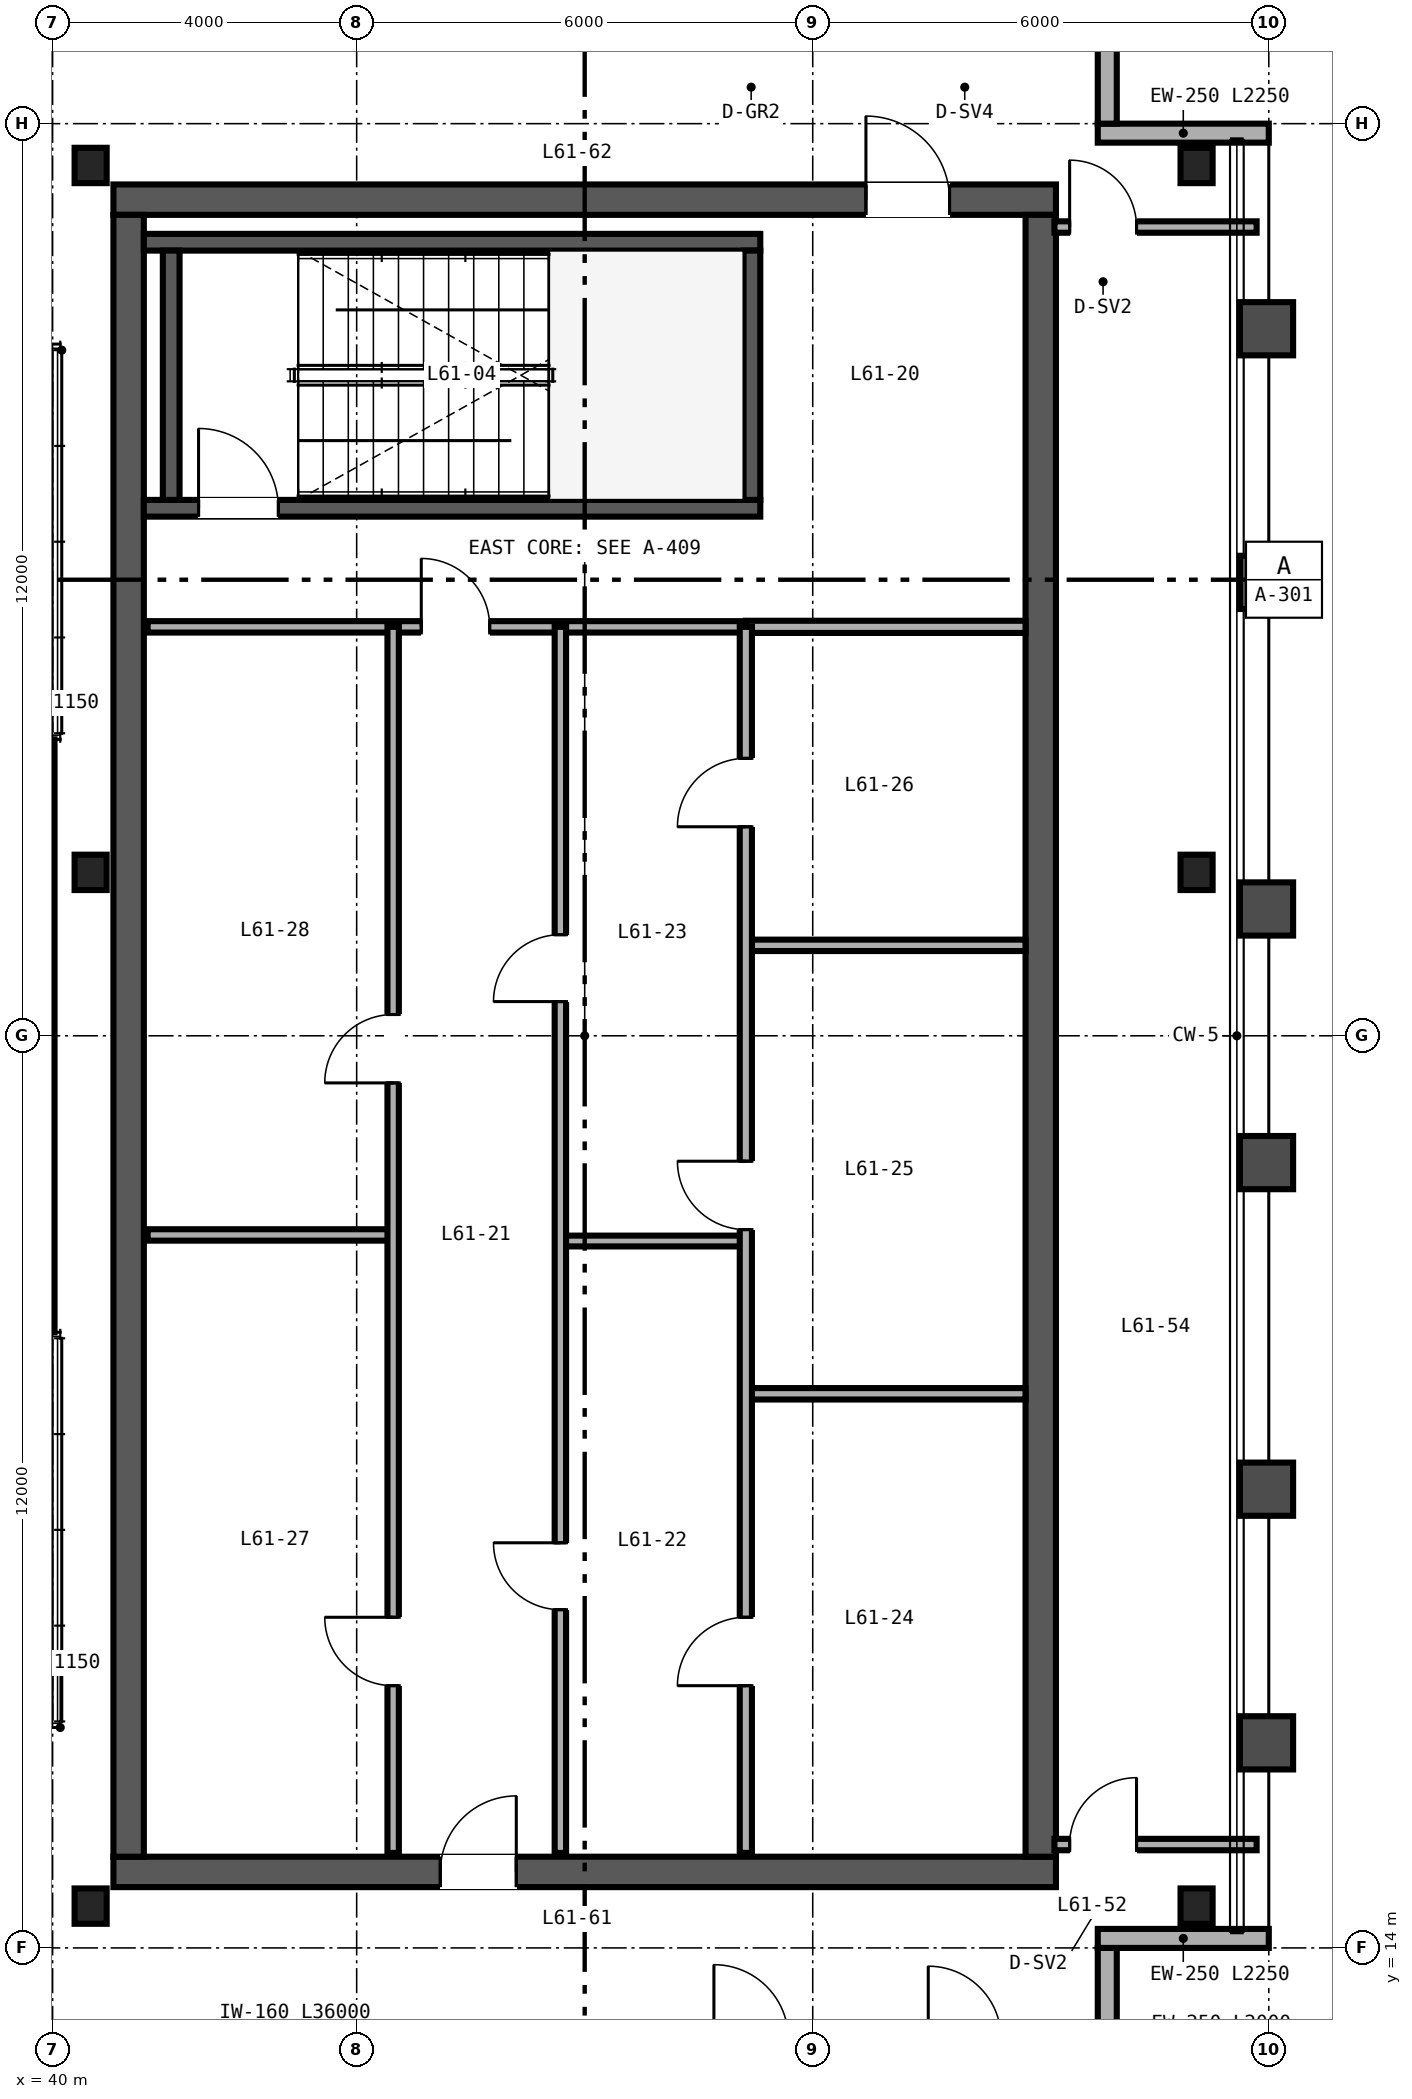
"""IFC4 building model, lengths in metres.
Left out: names, types, materials, properties, quantities, classifications, styles, units other than length and angle.
Written with IfcOpenShell. Run it as: python <this file> out.ifc"""

import sys

from ifc_helpers import new_model, si_unit, direction, frame, frame_2d, origin, origin_2d, place, context, subcontext, project, spatial, rectangle, i_section, extrude, source, transform, mapped, element, fill, save


model = new_model("IFC4")
c1 = context("Model", 3, precision=1e-05, world=origin(), true_north=direction((0.0, 1.0)))
c2 = subcontext(c1, "Body", "Model", "MODEL_VIEW")
j1 = project(units=[si_unit("LENGTHUNIT", "METRE"), si_unit("PLANEANGLEUNIT", "RADIAN")], contexts=[c1])
p1 = place(None, origin())
s1 = spatial("IfcSite", under=j1, at=p1, CompositionType="ELEMENT")
p2 = place(p1, origin())
s2 = spatial("IfcBuilding", under=s1, at=p2, CompositionType="ELEMENT")
p3 = place(p2, frame((0.0, 0.0, 243.6)))
s3 = spatial("IfcBuildingStorey", under=s2, at=p3, CompositionType="ELEMENT", Elevation=243.6)
p4 = place(p3, frame((40.8, 15.0, 0.0), z_axis=(0.0, 0.0, 1.0), x_axis=(1.0, 0.0, 0.0)))
e1 = element("IfcWall", 1, at=p4, inside=s3, PredefinedType="SHEAR", context=c2, shape_type="SweptSolid", body=[
    extrude(rectangle(XDim=12.4, YDim=0.4, at=frame_2d((6.2, 0.0))), origin(), (0.0, 0.0, 1.0), 3.28),
])
p5 = place(p4, frame((4.3, 0.0, 0.0)))
e2 = element("IfcOpeningElement", 2, at=p5, cuts=e1, PredefinedType="OPENING", context=c2, shape_type="SweptSolid", body=[
    extrude(rectangle(XDim=1.0, YDim=2.15, at=frame_2d((0.5, 1.075))), frame((0.0, 0.21, 0.0), z_axis=(0.0, -1.0, 0.0), x_axis=(1.0, 0.0, 0.0)), (0.0, 0.0, 1.0), 0.42),
])
p6 = place(p3, frame((40.8, 37.0, 0.0), z_axis=(0.0, 0.0, 1.0), x_axis=(1.0, 0.0, 0.0)))
e3 = element("IfcWall", 3, at=p6, inside=s3, PredefinedType="SHEAR", context=c2, shape_type="SweptSolid", body=[
    extrude(rectangle(XDim=12.4, YDim=0.4, at=frame_2d((6.2, 0.0))), origin(), (0.0, 0.0, 1.0), 3.28),
])
p7 = place(p6, frame((9.9, 0.0, 0.0)))
e4 = element("IfcOpeningElement", 4, at=p7, cuts=e3, PredefinedType="OPENING", context=c2, shape_type="SweptSolid", body=[
    extrude(rectangle(XDim=1.1, YDim=2.15, at=frame_2d((0.55, 1.075))), frame((0.0, 0.21, 0.0), z_axis=(0.0, -1.0, 0.0), x_axis=(1.0, 0.0, 0.0)), (0.0, 0.0, 1.0), 0.42),
])
for number, where, z_axis, x_axis in (
    (5, (41.0, 15.2, 0.0), (0.0, 0.0, 1.0), (0.0, 1.0, 0.0)),
    (6, (53.0, 15.2, 0.0), (0.0, 0.0, 1.0), (0.0, 1.0, 0.0)),
):
    element("IfcWall", number, at=place(p3, frame(where, z_axis=z_axis, x_axis=x_axis)), inside=s3, PredefinedType="SHEAR", context=c2, shape_type="SweptSolid", body=[
        extrude(rectangle(XDim=21.6, YDim=0.4, at=frame_2d((10.8, 0.0))), origin(), (0.0, 0.0, 1.0), 3.28),
    ])
p8 = place(p3, frame((41.2, 32.94, 0.0), z_axis=(0.0, 0.0, 1.0), x_axis=(1.0, 0.0, 0.0)))
e7 = element("IfcWall", 7, at=p8, inside=s3, PredefinedType="SHEAR", context=c2, shape_type="SweptSolid", body=[
    extrude(rectangle(XDim=8.11, YDim=0.22, at=frame_2d((4.055, 0.0))), origin(), (0.0, 0.0, 1.0), 3.4),
])
p9 = place(p8, frame((0.72, 0.0, 0.0)))
e8 = element("IfcOpeningElement", 8, at=p9, cuts=e7, PredefinedType="OPENING", context=c2, shape_type="SweptSolid", body=[
    extrude(rectangle(XDim=1.05, YDim=2.15, at=frame_2d((0.525, 1.075))), frame((0.0, 0.12, 0.0), z_axis=(0.0, -1.0, 0.0), x_axis=(1.0, 0.0, 0.0)), (0.0, 0.0, 1.0), 0.24),
])
p10 = place(p3, frame((41.2, 36.44, 0.0), z_axis=(0.0, 0.0, 1.0), x_axis=(1.0, 0.0, 0.0)))
e9 = element("IfcWall", 9, at=p10, inside=s3, PredefinedType="SHEAR", context=c2, shape_type="SweptSolid", body=[
    extrude(rectangle(XDim=8.11, YDim=0.22, at=frame_2d((4.055, 0.0))), origin(), (0.0, 0.0, 1.0), 3.4),
])
for number, where, z_axis, x_axis in (
    (10, (41.56, 33.05, 0.0), (0.0, 0.0, 1.0), (0.0, 1.0, 0.0)),
    (11, (49.2, 33.05, 0.0), (0.0, 0.0, 1.0), (0.0, 1.0, 0.0)),
):
    element("IfcWall", number, at=place(p3, frame(where, z_axis=z_axis, x_axis=x_axis)), inside=s3, PredefinedType="SHEAR", context=c2, shape_type="SweptSolid", body=[
        extrude(rectangle(XDim=3.28, YDim=0.22, at=frame_2d((1.64, 0.0))), origin(), (0.0, 0.0, 1.0), 3.4),
    ])
m1 = source(origin(), c2, "Body", "SweptSolid", [
    extrude(i_section(OverallWidth=0.422, OverallDepth=0.465, WebThickness=0.045, FlangeThickness=0.073, FilletRadius=0.025, at=origin_2d()), origin(), (0.0, 0.0, 1.0), 3.28),
])
for number, where, z_axis, x_axis in (
    (12, (40.5, 14.55, 0.0), (0.0, 0.0, 1.0), (1.0, 0.0, 0.0)),
    (13, (55.05, 14.55, 0.0), (0.0, 0.0, 1.0), (1.0, 0.0, 0.0)),
    (14, (40.5, 28.15, 0.0), (0.0, 0.0, 1.0), (1.0, 0.0, 0.0)),
    (15, (55.05, 28.15, 0.0), (0.0, 0.0, 1.0), (1.0, 0.0, 0.0)),
    (16, (40.5, 37.45, 0.0), (0.0, 0.0, 1.0), (1.0, 0.0, 0.0)),
    (17, (55.05, 37.45, 0.0), (0.0, 0.0, 1.0), (1.0, 0.0, 0.0)),
):
    element("IfcColumn", number, at=place(p3, frame(where, z_axis=z_axis, x_axis=x_axis)), inside=s3, PredefinedType="COLUMN", context=c2, shape_type="MappedRepresentation", body=[
        mapped(m1, transform((0.0, 0.0, 0.0), scale=1.0)),
    ])
p11 = place(p3, frame((53.875, 12.0, 0.0), z_axis=(0.0, 0.0, 1.0), x_axis=(0.0, 1.0, 0.0)))
e18 = element("IfcWall", 18, at=p11, inside=s3, PredefinedType="SOLIDWALL", context=c2, shape_type="SweptSolid", body=[
    extrude(rectangle(XDim=2.0, YDim=0.25, at=frame_2d((1.0, 0.0))), origin(), (0.0, 0.0, 1.0), 3.28),
])
for number, where, z_axis, x_axis in (
    (19, (53.75, 14.125, 0.0), (0.0, 0.0, 1.0), (1.0, 0.0, 0.0)),
    (20, (56.0, 37.875, 0.0), (0.0, 0.0, 1.0), (-1.0, 0.0, 0.0)),
):
    element("IfcWall", number, at=place(p3, frame(where, z_axis=z_axis, x_axis=x_axis)), inside=s3, PredefinedType="SOLIDWALL", context=c2, shape_type="SweptSolid", body=[
        extrude(rectangle(XDim=2.25, YDim=0.25, at=frame_2d((1.125, 0.0))), origin(), (0.0, 0.0, 1.0), 3.28),
    ])
p12 = place(p3, frame((53.875, 38.0, 0.0), z_axis=(0.0, 0.0, 1.0), x_axis=(0.0, 1.0, 0.0)))
e21 = element("IfcWall", 21, at=p12, inside=s3, PredefinedType="SOLIDWALL", context=c2, shape_type="SweptSolid", body=[
    extrude(rectangle(XDim=2.0, YDim=0.25, at=frame_2d((1.0, 0.0))), origin(), (0.0, 0.0, 1.0), 3.28),
])
p13 = place(p3, frame((41.25, 31.38, 0.0), z_axis=(0.0, 0.0, 1.0), x_axis=(1.0, 0.0, 0.0)))
e22 = element("IfcWall", 22, at=p13, inside=s3, PredefinedType="PARTITIONING", context=c2, shape_type="SweptSolid", body=[
    extrude(rectangle(XDim=7.87, YDim=0.15, at=frame_2d((3.935, 0.0))), origin(), (0.0, 0.0, 1.0), 2.38),
])
p14 = place(p13, frame((3.6, 0.0, 0.0)))
e23 = element("IfcOpeningElement", 23, at=p14, cuts=e22, PredefinedType="OPENING", context=c2, shape_type="SweptSolid", body=[
    extrude(rectangle(XDim=0.9, YDim=2.15, at=frame_2d((0.45, 1.075))), frame((0.0, 0.085, 0.0), z_axis=(0.0, -1.0, 0.0), x_axis=(1.0, 0.0, 0.0)), (0.0, 0.0, 1.0), 0.17),
])
p15 = place(p3, frame((46.68, 23.3, 0.0), z_axis=(0.0, 0.0, 1.0), x_axis=(1.0, 0.0, 0.0)))
e24 = element("IfcWall", 24, at=p15, inside=s3, PredefinedType="PARTITIONING", context=c2, shape_type="SweptSolid", body=[
    extrude(rectangle(XDim=2.44, YDim=0.142, at=frame_2d((1.22, 0.0))), origin(), (0.0, 0.0, 1.0), 3.28),
])
p16 = place(p3, frame((46.68, 15.25, 0.0), z_axis=(0.0, 0.0, 1.0), x_axis=(0.0, 1.0, 0.0)))
e25 = element("IfcWall", 25, at=p16, inside=s3, PredefinedType="PARTITIONING", context=c2, shape_type="SweptSolid", body=[
    extrude(rectangle(XDim=16.13, YDim=0.15, at=frame_2d((8.065, 0.0))), origin(), (0.0, 0.0, 1.0), 2.36),
])
p17 = place(p16, frame((3.2, 0.0, 0.0)))
e26 = element("IfcOpeningElement", 26, at=p17, cuts=e25, PredefinedType="OPENING", context=c2, shape_type="SweptSolid", body=[
    extrude(rectangle(XDim=0.88, YDim=2.15, at=frame_2d((0.44, 1.075))), frame((0.0, 0.085, 0.0), z_axis=(0.0, -1.0, 0.0), x_axis=(1.0, 0.0, 0.0)), (0.0, 0.0, 1.0), 0.17),
])
p18 = place(p16, frame((11.2, 0.0, 0.0)))
e27 = element("IfcOpeningElement", 27, at=p18, cuts=e25, PredefinedType="OPENING", context=c2, shape_type="SweptSolid", body=[
    extrude(rectangle(XDim=0.88, YDim=2.15, at=frame_2d((0.44, 1.075))), frame((0.0, 0.085, 0.0), z_axis=(0.0, -1.0, 0.0), x_axis=(1.0, 0.0, 0.0)), (0.0, 0.0, 1.0), 0.17),
])
p19 = place(p3, frame((49.12, 31.38, 0.0), z_axis=(0.0, 0.0, 1.0), x_axis=(1.0, 0.0, 0.0)))
e28 = element("IfcWall", 28, at=p19, inside=s3, PredefinedType="PARTITIONING", context=c2, shape_type="SweptSolid", body=[
    extrude(rectangle(XDim=3.68, YDim=0.16, at=frame_2d((1.84, 0.0))), origin(), (0.0, 0.0, 1.0), 2.38),
])
for number, where, z_axis, x_axis in (
    (29, (49.12, 21.29, 0.0), (0.0, 0.0, 1.0), (1.0, 0.0, 0.0)),
    (30, (49.12, 27.19, 0.0), (0.0, 0.0, 1.0), (1.0, 0.0, 0.0)),
):
    element("IfcWall", number, at=place(p3, frame(where, z_axis=z_axis, x_axis=x_axis)), inside=s3, PredefinedType="PARTITIONING", context=c2, shape_type="SweptSolid", body=[
        extrude(rectangle(XDim=3.68, YDim=0.15, at=frame_2d((1.84, 0.0))), origin(), (0.0, 0.0, 1.0), 3.28),
    ])
p20 = place(p3, frame((49.12, 15.25, 0.0), z_axis=(0.0, 0.0, 1.0), x_axis=(0.0, 1.0, 0.0)))
e31 = element("IfcWall", 31, at=p20, inside=s3, PredefinedType="PARTITIONING", context=c2, shape_type="SweptSolid", body=[
    extrude(rectangle(XDim=16.13, YDim=0.16, at=frame_2d((8.065, 0.0))), origin(), (0.0, 0.0, 1.0), 2.36),
])
p21 = place(p20, frame((2.2, 0.0, 0.0)))
e32 = element("IfcOpeningElement", 32, at=p21, cuts=e31, PredefinedType="OPENING", context=c2, shape_type="SweptSolid", body=[
    extrude(rectangle(XDim=0.9, YDim=2.15, at=frame_2d((0.45, 1.075))), frame((0.0, 0.09, 0.0), z_axis=(0.0, -1.0, 0.0), x_axis=(1.0, 0.0, 0.0)), (0.0, 0.0, 1.0), 0.18),
])
p22 = place(p20, frame((8.2, 0.0, 0.0)))
e33 = element("IfcOpeningElement", 33, at=p22, cuts=e31, PredefinedType="OPENING", context=c2, shape_type="SweptSolid", body=[
    extrude(rectangle(XDim=0.9, YDim=2.15, at=frame_2d((0.45, 1.075))), frame((0.0, 0.09, 0.0), z_axis=(0.0, -1.0, 0.0), x_axis=(1.0, 0.0, 0.0)), (0.0, 0.0, 1.0), 0.18),
])
p23 = place(p20, frame((13.5, 0.0, 0.0)))
e34 = element("IfcOpeningElement", 34, at=p23, cuts=e31, PredefinedType="OPENING", context=c2, shape_type="SweptSolid", body=[
    extrude(rectangle(XDim=0.9, YDim=2.15, at=frame_2d((0.45, 1.075))), frame((0.0, 0.09, 0.0), z_axis=(0.0, -1.0, 0.0), x_axis=(1.0, 0.0, 0.0)), (0.0, 0.0, 1.0), 0.18),
])
p24 = place(p3, frame((41.25, 23.38, 0.0), z_axis=(0.0, 0.0, 1.0), x_axis=(1.0, 0.0, 0.0)))
e35 = element("IfcWall", 35, at=p24, inside=s3, PredefinedType="PARTITIONING", context=c2, shape_type="SweptSolid", body=[
    extrude(rectangle(XDim=3.23, YDim=0.15, at=frame_2d((1.615, 0.0))), origin(), (0.0, 0.0, 1.0), 3.28),
])
p25 = place(p3, frame((44.48, 15.25, 0.0), z_axis=(0.0, 0.0, 1.0), x_axis=(0.0, 1.0, 0.0)))
e36 = element("IfcWall", 36, at=p25, inside=s3, PredefinedType="PARTITIONING", context=c2, shape_type="SweptSolid", body=[
    extrude(rectangle(XDim=16.13, YDim=0.15, at=frame_2d((8.065, 0.0))), origin(), (0.0, 0.0, 1.0), 2.36),
])
p26 = place(p25, frame((2.2, 0.0, 0.0)))
e37 = element("IfcOpeningElement", 37, at=p26, cuts=e36, PredefinedType="OPENING", context=c2, shape_type="SweptSolid", body=[
    extrude(rectangle(XDim=0.9, YDim=2.15, at=frame_2d((0.45, 1.075))), frame((0.0, 0.085, 0.0), z_axis=(0.0, -1.0, 0.0), x_axis=(1.0, 0.0, 0.0)), (0.0, 0.0, 1.0), 0.17),
])
p27 = place(p25, frame((10.13, 0.0, 0.0)))
e38 = element("IfcOpeningElement", 38, at=p27, cuts=e36, PredefinedType="OPENING", context=c2, shape_type="SweptSolid", body=[
    extrude(rectangle(XDim=0.9, YDim=2.15, at=frame_2d((0.45, 1.075))), frame((0.0, 0.085, 0.0), z_axis=(0.0, -1.0, 0.0), x_axis=(1.0, 0.0, 0.0)), (0.0, 0.0, 1.0), 0.17),
])
p28 = place(p3, frame((39.95, 22.1, 0.0), z_axis=(0.0, 0.0, 1.0), x_axis=(0.0, 1.0, 0.0)))
e39 = element("IfcWall", 39, at=p28, inside=s3, PredefinedType="PARTITIONING", context=c2, shape_type="SweptSolid", body=[
    extrude(rectangle(XDim=7.8, YDim=0.15, at=frame_2d((3.9, 0.0))), origin(), (0.0, 0.0, 1.0), 2.36),
])
p29 = place(p3, frame((53.18, 15.36, 0.0), z_axis=(0.0, 0.0, 1.0), x_axis=(1.0, 0.0, 0.0)))
e40 = element("IfcWall", 40, at=p29, inside=s3, PredefinedType="PARTITIONING", context=c2, shape_type="SweptSolid", body=[
    extrude(rectangle(XDim=2.66, YDim=0.15, at=frame_2d((1.33, 0.0))), origin(), (0.0, 0.0, 1.0), 2.501),
])
p30 = place(p29, frame((0.2, 0.0, 0.0)))
e41 = element("IfcOpeningElement", 41, at=p30, cuts=e40, PredefinedType="OPENING", context=c2, shape_type="SweptSolid", body=[
    extrude(rectangle(XDim=0.88, YDim=2.15, at=frame_2d((0.44, 1.075))), frame((0.0, 0.085, 0.0), z_axis=(0.0, -1.0, 0.0), x_axis=(1.0, 0.0, 0.0)), (0.0, 0.0, 1.0), 0.17),
])
p31 = place(p3, frame((53.18, 36.64, 0.0), z_axis=(0.0, 0.0, 1.0), x_axis=(1.0, 0.0, 0.0)))
e42 = element("IfcWall", 42, at=p31, inside=s3, PredefinedType="PARTITIONING", context=c2, shape_type="SweptSolid", body=[
    extrude(rectangle(XDim=2.66, YDim=0.15, at=frame_2d((1.33, 0.0))), origin(), (0.0, 0.0, 1.0), 2.663),
])
p32 = place(p31, frame((0.2, 0.0, 0.0)))
e43 = element("IfcOpeningElement", 43, at=p32, cuts=e42, PredefinedType="OPENING", context=c2, shape_type="SweptSolid", body=[
    extrude(rectangle(XDim=0.88, YDim=2.15, at=frame_2d((0.44, 1.075))), frame((0.0, 0.085, 0.0), z_axis=(0.0, -1.0, 0.0), x_axis=(1.0, 0.0, 0.0)), (0.0, 0.0, 1.0), 0.17),
])
m2 = source(origin(), c2, "Body", "SweptSolid", [
    extrude(rectangle(XDim=1.05, YDim=2.15, at=frame_2d((0.525, 1.075))), frame((0.0, 0.025, 0.0), z_axis=(0.0, -1.0, 0.0), x_axis=(1.0, 0.0, 0.0)), (0.0, 0.0, 1.0), 0.05),
])
p33 = place(p9, origin())
e44 = element("IfcDoor", 44, at=p33, inside=s3, OperationType="SINGLE_SWING_LEFT", PredefinedType="DOOR", context=c2, shape_type="MappedRepresentation", body=[
    mapped(m2, transform((0.0, 0.0, 0.0), scale=1.0)),
])
fill(e8, e44)
m3 = source(origin(), c2, "Body", "SweptSolid", [
    extrude(rectangle(XDim=0.88, YDim=2.15, at=frame_2d((0.44, 1.075))), frame((0.0, 0.025, 0.0), z_axis=(0.0, -1.0, 0.0), x_axis=(1.0, 0.0, 0.0)), (0.0, 0.0, 1.0), 0.05),
])
p34 = place(p17, origin())
e45 = element("IfcDoor", 45, at=p34, inside=s3, OperationType="SINGLE_SWING_RIGHT", PredefinedType="DOOR", context=c2, shape_type="MappedRepresentation", body=[
    mapped(m3, transform((0.0, 0.0, 0.0), scale=1.0)),
])
fill(e26, e45)
p35 = place(p18, origin())
e46 = element("IfcDoor", 46, at=p35, inside=s3, OperationType="SINGLE_SWING_LEFT", PredefinedType="DOOR", context=c2, shape_type="MappedRepresentation", body=[
    mapped(m3, transform((0.0, 0.0, 0.0), scale=1.0)),
])
fill(e27, e46)
m4 = source(origin(), c2, "Body", "SweptSolid", [
    extrude(rectangle(XDim=0.9, YDim=2.15, at=frame_2d((0.45, 1.075))), frame((0.0, 0.025, 0.0), z_axis=(0.0, -1.0, 0.0), x_axis=(1.0, 0.0, 0.0)), (0.0, 0.0, 1.0), 0.05),
])
p36 = place(p14, origin())
e47 = element("IfcDoor", 47, at=p36, inside=s3, OperationType="SINGLE_SWING_LEFT", PredefinedType="DOOR", context=c2, shape_type="MappedRepresentation", body=[
    mapped(m4, transform((0.0, 0.0, 0.0), scale=1.0)),
])
fill(e23, e47)
m5 = source(origin(), c2, "Body", "SweptSolid", [
    extrude(rectangle(XDim=1.0, YDim=2.15, at=frame_2d((0.5, 1.075))), frame((0.0, 0.025, 0.0), z_axis=(0.0, -1.0, 0.0), x_axis=(1.0, 0.0, 0.0)), (0.0, 0.0, 1.0), 0.05),
])
p37 = place(p5, origin())
e48 = element("IfcDoor", 48, at=p37, inside=s3, OperationType="SINGLE_SWING_RIGHT", PredefinedType="DOOR", context=c2, shape_type="MappedRepresentation", body=[
    mapped(m5, transform((0.0, 0.0, 0.0), scale=1.0)),
])
fill(e2, e48)
m6 = source(origin(), c2, "Body", "SweptSolid", [
    extrude(rectangle(XDim=1.1, YDim=2.15, at=frame_2d((0.55, 1.075))), frame((0.0, 0.025, 0.0), z_axis=(0.0, -1.0, 0.0), x_axis=(1.0, 0.0, 0.0)), (0.0, 0.0, 1.0), 0.05),
])
p38 = place(p7, origin())
e49 = element("IfcDoor", 49, at=p38, inside=s3, OperationType="SINGLE_SWING_LEFT", PredefinedType="DOOR", context=c2, shape_type="MappedRepresentation", body=[
    mapped(m6, transform((0.0, 0.0, 0.0), scale=1.0)),
])
fill(e4, e49)
p39 = place(p21, origin())
e50 = element("IfcDoor", 50, at=p39, inside=s3, OperationType="SINGLE_SWING_LEFT", PredefinedType="DOOR", context=c2, shape_type="MappedRepresentation", body=[
    mapped(m4, transform((0.0, 0.0, 0.0), scale=1.0)),
])
fill(e32, e50)
p40 = place(p22, origin())
e51 = element("IfcDoor", 51, at=p40, inside=s3, OperationType="SINGLE_SWING_RIGHT", PredefinedType="DOOR", context=c2, shape_type="MappedRepresentation", body=[
    mapped(m4, transform((0.0, 0.0, 0.0), scale=1.0)),
])
fill(e33, e51)
p41 = place(p23, origin())
e52 = element("IfcDoor", 52, at=p41, inside=s3, OperationType="SINGLE_SWING_LEFT", PredefinedType="DOOR", context=c2, shape_type="MappedRepresentation", body=[
    mapped(m4, transform((0.0, 0.0, 0.0), scale=1.0)),
])
fill(e34, e52)
p42 = place(p26, origin())
e53 = element("IfcDoor", 53, at=p42, inside=s3, OperationType="SINGLE_SWING_RIGHT", PredefinedType="DOOR", context=c2, shape_type="MappedRepresentation", body=[
    mapped(m4, transform((0.0, 0.0, 0.0), scale=1.0)),
])
fill(e37, e53)
p43 = place(p27, origin())
e54 = element("IfcDoor", 54, at=p43, inside=s3, OperationType="SINGLE_SWING_LEFT", PredefinedType="DOOR", context=c2, shape_type="MappedRepresentation", body=[
    mapped(m4, transform((0.0, 0.0, 0.0), scale=1.0)),
])
fill(e38, e54)
p44 = place(p30, origin())
e55 = element("IfcDoor", 55, at=p44, inside=s3, OperationType="SINGLE_SWING_RIGHT", PredefinedType="DOOR", context=c2, shape_type="MappedRepresentation", body=[
    mapped(m3, transform((0.0, 0.0, 0.0), scale=1.0)),
])
fill(e41, e55)
p45 = place(p32, origin())
e56 = element("IfcDoor", 56, at=p45, inside=s3, OperationType="SINGLE_SWING_LEFT", PredefinedType="DOOR", context=c2, shape_type="MappedRepresentation", body=[
    mapped(m3, transform((0.0, 0.0, 0.0), scale=1.0)),
])
fill(e43, e56)
save(model, sys.argv[1])
